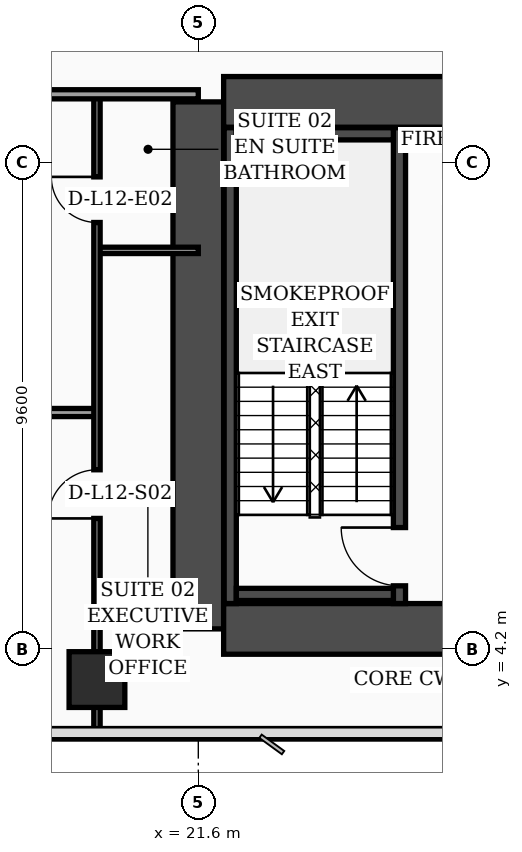
"""IFC4 building model, lengths in metres.
Left out: names, types, materials, properties, quantities, classifications, styles, units other than length and angle.
Written with IfcOpenShell. Run it as: python <this file> out.ifc"""

import sys

from ifc_helpers import new_model, si_unit, direction, frame, frame_2d, origin, origin_2d, place, context, subcontext, project, spatial, rectangle, hollow_rectangle, extrude, element, fill, save


model = new_model("IFC4")
c1 = context("Model", 3, precision=1e-05, world=origin(), true_north=direction((0.0, 1.0)))
c2 = subcontext(c1, "Body", "Model", "MODEL_VIEW")
j1 = project(units=[si_unit("LENGTHUNIT", "METRE"), si_unit("PLANEANGLEUNIT", "RADIAN")], contexts=[c1])
p1 = place(None, origin())
s1 = spatial("IfcSite", under=j1, at=p1, CompositionType="ELEMENT")
p2 = place(p1, origin())
s2 = spatial("IfcBuilding", under=s1, at=p2, CompositionType="ELEMENT")
p3 = place(p2, frame((0.0, 0.0, 54.6)))
s3 = spatial("IfcBuildingStorey", under=s2, at=p3, CompositionType="ELEMENT", Elevation=54.6)
p4 = place(p3, frame((21.6, 4.6, 0.0), z_axis=(0.0, 0.0, 1.0), x_axis=(0.0, 1.0, 0.0)))
e1 = element("IfcWall", 1, at=p4, inside=s3, PredefinedType="SHEAR", context=c2, shape_type="SweptSolid", body=[
    extrude(rectangle(XDim=10.4, YDim=1.0, at=frame_2d((5.2, 0.0))), origin(), (0.0, 0.0, 1.0), 3.56),
])
p5 = place(p3, frame((22.1, 15.0, 0.0), z_axis=(0.0, 0.0, 1.0), x_axis=(1.0, 0.0, 0.0)))
e2 = element("IfcWall", 2, at=p5, inside=s3, PredefinedType="SHEAR", context=c2, shape_type="SweptSolid", body=[
    extrude(rectangle(XDim=9.8, YDim=1.0, at=frame_2d((4.9, 0.0))), origin(), (0.0, 0.0, 1.0), 3.56),
])
p6 = place(p5, frame((4.8, 0.0, 0.0)))
e3 = element("IfcOpeningElement", 3, at=p6, cuts=e2, PredefinedType="OPENING", context=c2, shape_type="SweptSolid", body=[
    extrude(rectangle(XDim=1.1, YDim=2.2, at=frame_2d((0.55, 1.1))), frame((0.0, 0.51, 0.0), z_axis=(0.0, -1.0, 0.0), x_axis=(1.0, 0.0, 0.0)), (0.0, 0.0, 1.0), 1.02),
])
p7 = place(p3, frame((22.1, 4.6, 0.0), z_axis=(0.0, 0.0, 1.0), x_axis=(1.0, 0.0, 0.0)))
e4 = element("IfcWall", 4, at=p7, inside=s3, PredefinedType="SHEAR", context=c2, shape_type="SweptSolid", body=[
    extrude(rectangle(XDim=9.8, YDim=1.0, at=frame_2d((4.9, 0.0))), origin(), (0.0, 0.0, 1.0), 3.56),
])
p8 = place(p3, frame((22.23, 5.1, 0.0), z_axis=(0.0, 0.0, 1.0), x_axis=(0.0, 1.0, 0.0)))
e5 = element("IfcWall", 5, at=p8, inside=s3, PredefinedType="SOLIDWALL", context=c2, shape_type="SweptSolid", body=[
    extrude(rectangle(XDim=9.39, YDim=0.24, at=frame_2d((4.695, 0.0))), origin(), (0.0, 0.0, 1.0), 3.56),
])
p9 = place(p3, frame((25.57, 5.1, 0.0), z_axis=(0.0, 0.0, 1.0), x_axis=(0.0, 1.0, 0.0)))
e6 = element("IfcWall", 6, at=p9, inside=s3, PredefinedType="SOLIDWALL", context=c2, shape_type="SweptSolid", body=[
    extrude(rectangle(XDim=9.39, YDim=0.24, at=frame_2d((4.695, 0.0))), origin(), (0.0, 0.0, 1.0), 3.56),
])
p10 = place(p9, frame((0.35, 0.0, 0.0)))
e7 = element("IfcOpeningElement", 7, at=p10, cuts=e6, PredefinedType="OPENING", context=c2, shape_type="SweptSolid", body=[
    extrude(rectangle(XDim=1.15, YDim=2.2, at=frame_2d((0.575, 1.1))), frame((0.0, 0.13, 0.0), z_axis=(0.0, -1.0, 0.0), x_axis=(1.0, 0.0, 0.0)), (0.0, 0.0, 1.0), 0.26),
])
for number, where, z_axis, x_axis in (
    (8, (22.35, 5.28, 0.0), (0.0, 0.0, 1.0), (1.0, 0.0, 0.0)),
    (9, (22.35, 14.37, 0.0), (0.0, 0.0, 1.0), (1.0, 0.0, 0.0)),
):
    element("IfcWall", number, at=place(p3, frame(where, z_axis=z_axis, x_axis=x_axis)), inside=s3, PredefinedType="SOLIDWALL", context=c2, shape_type="SweptSolid", body=[
        extrude(rectangle(XDim=3.1, YDim=0.24, at=frame_2d((1.55, 0.0))), origin(), (0.0, 0.0, 1.0), 3.56),
    ])
p11 = place(p3, frame((19.6, 3.6, 0.0), z_axis=(0.0, 0.0, 1.0), x_axis=(1.0, 0.0, 0.0)))
e10 = element("IfcColumn", 10, at=p11, inside=s3, PredefinedType="COLUMN", context=c2, shape_type="SweptSolid", body=[
    extrude(hollow_rectangle(XDim=1.1, YDim=1.1, WallThickness=0.045, at=origin_2d()), origin(), (0.0, 0.0, 1.0), 3.56),
])
p12 = place(p3, frame((19.6, 12.07, 0.0), z_axis=(0.0, 0.0, 1.0), x_axis=(1.0, 0.0, 0.0)))
e11 = element("IfcWall", 11, at=p12, inside=s3, PredefinedType="PARTITIONING", context=c2, shape_type="SweptSolid", body=[
    extrude(rectangle(XDim=2.0, YDim=0.125, at=frame_2d((1.0, 0.0))), origin(), (0.0, 0.0, 1.0), 3.56),
])
p13 = place(p3, frame((15.15, 8.87, 0.0), z_axis=(0.0, 0.0, 1.0), x_axis=(1.0, 0.0, 0.0)))
e12 = element("IfcWall", 12, at=p13, inside=s3, PredefinedType="PARTITIONING", context=c2, shape_type="SweptSolid", body=[
    extrude(rectangle(XDim=4.45, YDim=0.16, at=frame_2d((2.225, 0.0))), origin(), (0.0, 0.0, 1.0), 3.56),
])
p14 = place(p13, frame((1.75, 0.0, 0.0)))
e13 = element("IfcOpeningElement", 13, at=p14, cuts=e12, PredefinedType="OPENING", context=c2, shape_type="SweptSolid", body=[
    extrude(rectangle(XDim=0.96, YDim=2.2, at=frame_2d((0.48, 1.1))), frame((0.0, 0.09, 0.0), z_axis=(0.0, -1.0, 0.0), x_axis=(1.0, 0.0, 0.0)), (0.0, 0.0, 1.0), 0.18),
])
p15 = place(p3, frame((19.6, 2.44, 0.0), z_axis=(0.0, 0.0, 1.0), x_axis=(0.0, 1.0, 0.0)))
e14 = element("IfcWall", 14, at=p15, inside=s3, PredefinedType="PARTITIONING", context=c2, shape_type="SweptSolid", body=[
    extrude(rectangle(XDim=12.71, YDim=0.125, at=frame_2d((6.355, 0.0))), origin(), (0.0, 0.0, 1.0), 2.34),
])
p16 = place(p15, frame((4.34, 0.0, 0.0)))
e15 = element("IfcOpeningElement", 15, at=p16, cuts=e14, PredefinedType="OPENING", context=c2, shape_type="SweptSolid", body=[
    extrude(rectangle(XDim=0.96, YDim=2.2, at=frame_2d((0.48, 1.1))), frame((0.0, 0.073, 0.0), z_axis=(0.0, -1.0, 0.0), x_axis=(1.0, 0.0, 0.0)), (0.0, 0.0, 1.0), 0.145),
])
p17 = place(p15, frame((10.18, 0.0, 0.0)))
e16 = element("IfcOpeningElement", 16, at=p17, cuts=e14, PredefinedType="OPENING", context=c2, shape_type="SweptSolid", body=[
    extrude(rectangle(XDim=0.9, YDim=2.15, at=frame_2d((0.45, 1.075))), frame((0.0, 0.073, 0.0), z_axis=(0.0, -1.0, 0.0), x_axis=(1.0, 0.0, 0.0)), (0.0, 0.0, 1.0), 0.145),
])
p18 = place(p3, frame((15.15, 15.15, 0.0), z_axis=(0.0, 0.0, 1.0), x_axis=(1.0, 0.0, 0.0)))
e17 = element("IfcWall", 17, at=p18, inside=s3, PredefinedType="PARTITIONING", context=c2, shape_type="SweptSolid", body=[
    extrude(rectangle(XDim=6.45, YDim=0.18, at=frame_2d((3.225, 0.0))), origin(), (0.0, 0.0, 1.0), 2.34),
])
p19 = place(p18, frame((1.74, 0.0, 0.0)))
e18 = element("IfcOpeningElement", 18, at=p19, cuts=e17, PredefinedType="OPENING", context=c2, shape_type="SweptSolid", body=[
    extrude(rectangle(XDim=1.02, YDim=2.2, at=frame_2d((0.51, 1.1))), frame((0.0, 0.1, 0.0), z_axis=(0.0, -1.0, 0.0), x_axis=(1.0, 0.0, 0.0)), (0.0, 0.0, 1.0), 0.2),
])
p20 = place(p16, origin())
e19 = element("IfcDoor", 19, at=p20, inside=s3, OperationType="SINGLE_SWING_LEFT", PredefinedType="DOOR", context=c2, shape_type="SweptSolid", body=[
    extrude(rectangle(XDim=0.96, YDim=2.2, at=frame_2d((0.48, 1.1))), frame((0.0, 0.025, 0.0), z_axis=(0.0, -1.0, 0.0), x_axis=(1.0, 0.0, 0.0)), (0.0, 0.0, 1.0), 0.05),
])
fill(e15, e19)
p21 = place(p17, origin())
e20 = element("IfcDoor", 20, at=p21, inside=s3, OperationType="SINGLE_SWING_RIGHT", PredefinedType="DOOR", context=c2, shape_type="SweptSolid", body=[
    extrude(rectangle(XDim=0.9, YDim=2.15, at=frame_2d((0.45, 1.075))), frame((0.0, 0.025, 0.0), z_axis=(0.0, -1.0, 0.0), x_axis=(1.0, 0.0, 0.0)), (0.0, 0.0, 1.0), 0.05),
])
fill(e16, e20)
p22 = place(p10, origin())
e21 = element("IfcDoor", 21, at=p22, inside=s3, OperationType="SINGLE_SWING_RIGHT", PredefinedType="DOOR", context=c2, shape_type="SweptSolid", body=[
    extrude(rectangle(XDim=1.15, YDim=2.2, at=frame_2d((0.575, 1.1))), frame((0.0, 0.025, 0.0), z_axis=(0.0, -1.0, 0.0), x_axis=(1.0, 0.0, 0.0)), (0.0, 0.0, 1.0), 0.05),
])
fill(e7, e21)
save(model, sys.argv[1])
